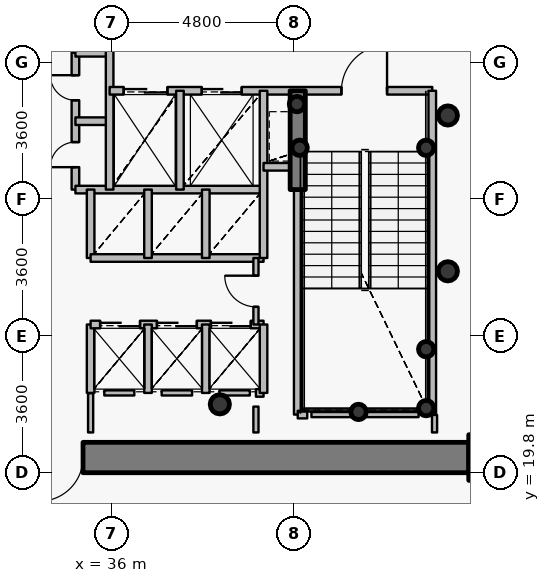
"""IFC4 building model, lengths in metres.
Left out: names, types, materials, properties, quantities, classifications, styles, units other than length and angle.
Written with IfcOpenShell. Run it as: python <this file> out.ifc"""

import sys

from ifc_helpers import new_model, si_unit, direction, frame, frame_2d, origin, origin_2d, place, context, subcontext, project, spatial, rectangle, hollow_circle, extrude, source, transform, mapped, element, fill, save


model = new_model("IFC4")
c1 = context("Model", 3, precision=1e-05, world=origin(), true_north=direction((0.0, 1.0)))
c2 = subcontext(c1, "Body", "Model", "MODEL_VIEW")
j1 = project(units=[si_unit("LENGTHUNIT", "METRE"), si_unit("PLANEANGLEUNIT", "RADIAN")], contexts=[c1])
p1 = place(None, origin())
s1 = spatial("IfcSite", under=j1, at=p1, CompositionType="ELEMENT")
p2 = place(p1, origin())
s2 = spatial("IfcBuilding", under=s1, at=p2, CompositionType="ELEMENT")
p3 = place(p2, frame((0.0, 0.0, 127.2)))
s3 = spatial("IfcBuildingStorey", under=s2, at=p3, CompositionType="ELEMENT", Elevation=127.2)
p4 = place(p3, frame((46.0, 20.2, 0.0), z_axis=(0.0, 0.0, 1.0), x_axis=(1.0, 0.0, 0.0)))
e1 = element("IfcColumn", 1, at=p4, inside=s3, PredefinedType="COLUMN", context=c2, shape_type="SweptSolid", body=[
    extrude(rectangle(XDim=1.2, YDim=1.2, at=origin_2d()), origin(), (0.0, 0.0, 1.0), 3.75),
])
p5 = place(p3, frame((38.85, 21.6, 0.0), z_axis=(0.0, 0.0, 1.0), x_axis=(1.0, 0.0, 0.0)))
e2 = element("IfcColumn", 2, at=p5, inside=s3, PredefinedType="COLUMN", context=c2, shape_type="SweptSolid", body=[
    extrude(hollow_circle(Radius=0.254, WallThickness=0.02, at=origin_2d()), origin(), (0.0, 0.0, 1.0), 3.75),
])
for number, where, z_axis, x_axis in (
    (3, (44.28, 21.5, 0.0), (0.0, 0.0, 1.0), (1.0, 0.0, 0.0)),
    (4, (44.28, 23.05, 0.0), (0.0, 0.0, 1.0), (1.0, 0.0, 0.0)),
    (5, (42.5, 21.4, 0.0), (0.0, 0.0, 1.0), (1.0, 0.0, 0.0)),
    (6, (40.95, 28.35, 0.0), (0.0, 0.0, 1.0), (1.0, 0.0, 0.0)),
    (7, (44.28, 28.35, 0.0), (0.0, 0.0, 1.0), (1.0, 0.0, 0.0)),
    (8, (40.88, 29.5, 0.0), (0.0, 0.0, 1.0), (1.0, 0.0, 0.0)),
):
    element("IfcColumn", number, at=place(p3, frame(where, z_axis=z_axis, x_axis=x_axis)), inside=s3, PredefinedType="COLUMN", context=c2, shape_type="SweptSolid", body=[
        extrude(hollow_circle(Radius=0.203, WallThickness=0.016, at=origin_2d()), origin(), (0.0, 0.0, 1.0), 3.75),
    ])
p6 = place(p3, frame((45.4, 20.2, 0.0), z_axis=(0.0, 0.0, 1.0), x_axis=(-1.0, 0.0, 0.0)))
e9 = element("IfcWall", 9, at=p6, inside=s3, PredefinedType="SHEAR", context=c2, shape_type="SweptSolid", body=[
    extrude(rectangle(XDim=18.8, YDim=0.8, at=frame_2d((9.4, 0.0))), origin(), (0.0, 0.0, 1.0), 2.95),
])
p7 = place(p6, frame((10.15, 0.0, 0.0)))
e10 = element("IfcOpeningElement", 10, at=p7, cuts=e9, PredefinedType="OPENING", context=c2, shape_type="SweptSolid", body=[
    extrude(rectangle(XDim=1.15, YDim=2.15, at=origin_2d()), frame((0.575, 0.41, 1.075), z_axis=(0.0, -1.0, 0.0), x_axis=(1.0, 0.0, 0.0)), (0.0, 0.0, 1.0), 0.82),
])
p8 = place(p3, frame((40.9, 27.25, 0.0), z_axis=(0.0, 0.0, 1.0), x_axis=(0.0, 1.0, 0.0)))
e11 = element("IfcWall", 11, at=p8, inside=s3, PredefinedType="SHEAR", context=c2, shape_type="SweptSolid", body=[
    extrude(rectangle(XDim=2.6, YDim=0.4, at=frame_2d((1.3, 0.0))), origin(), (0.0, 0.0, 1.0), 3.1),
])
for number, where, z_axis, x_axis in (
    (12, (44.85, 25.1, 0.0), (0.0, 0.0, 1.0), (1.0, 0.0, 0.0)),
    (13, (44.85, 29.2, 0.0), (0.0, 0.0, 1.0), (1.0, 0.0, 0.0)),
):
    element("IfcColumn", number, at=place(p3, frame(where, z_axis=z_axis, x_axis=x_axis)), inside=s3, PredefinedType="COLUMN", context=c2, shape_type="SweptSolid", body=[
        extrude(hollow_circle(Radius=0.254, WallThickness=0.02, at=origin_2d()), origin(), (0.0, 0.0, 1.0), 3.75),
    ])
p9 = place(p3, frame((35.05, 27.25, 0.0), z_axis=(0.0, 0.0, 1.0), x_axis=(0.0, 1.0, 0.0)))
e14 = element("IfcWall", 14, at=p9, inside=s3, PredefinedType="PARTITIONING", context=c2, shape_type="SweptSolid", body=[
    extrude(rectangle(XDim=3.6, YDim=0.2, at=frame_2d((1.8, 0.0))), origin(), (0.0, 0.0, 1.0), 3.5),
])
p10 = place(p9, frame((0.59, 0.0, 0.0)))
e15 = element("IfcOpeningElement", 15, at=p10, cuts=e14, PredefinedType="OPENING", context=c2, shape_type="SweptSolid", body=[
    extrude(rectangle(XDim=0.66, YDim=2.05, at=origin_2d()), frame((0.33, 0.11, 1.025), z_axis=(0.0, -1.0, 0.0), x_axis=(1.0, 0.0, 0.0)), (0.0, 0.0, 1.0), 0.22),
])
p11 = place(p9, frame((2.35, 0.0, 0.0)))
e16 = element("IfcOpeningElement", 16, at=p11, cuts=e14, PredefinedType="OPENING", context=c2, shape_type="SweptSolid", body=[
    extrude(rectangle(XDim=0.66, YDim=2.05, at=origin_2d()), frame((0.33, 0.11, 1.025), z_axis=(0.0, -1.0, 0.0), x_axis=(1.0, 0.0, 0.0)), (0.0, 0.0, 1.0), 0.22),
])
p12 = place(p3, frame((35.05, 27.25, 0.0), z_axis=(0.0, 0.0, 1.0), x_axis=(1.0, 0.0, 0.0)))
e17 = element("IfcWall", 17, at=p12, inside=s3, PredefinedType="PARTITIONING", context=c2, shape_type="SweptSolid", body=[
    extrude(rectangle(XDim=4.95, YDim=0.2, at=frame_2d((2.475, 0.0))), origin(), (0.0, 0.0, 1.0), 3.085),
])
for number, where, z_axis, x_axis in (
    (18, (35.05, 29.05, 0.0), (0.0, 0.0, 1.0), (1.0, 0.0, 0.0)),
    (19, (35.05, 30.85, 0.0), (0.0, 0.0, 1.0), (1.0, 0.0, 0.0)),
):
    element("IfcWall", number, at=place(p3, frame(where, z_axis=z_axis, x_axis=x_axis)), inside=s3, PredefinedType="PARTITIONING", context=c2, shape_type="SweptSolid", body=[
        extrude(rectangle(XDim=0.9, YDim=0.2, at=frame_2d((0.45, 0.0))), origin(), (0.0, 0.0, 1.0), 3.5),
    ])
p13 = place(p3, frame((35.45, 21.9, 0.0), z_axis=(0.0, 0.0, 1.0), x_axis=(0.0, 1.0, 0.0)))
e20 = element("IfcWall", 20, at=p13, inside=s3, PredefinedType="PARTITIONING", context=c2, shape_type="SweptSolid", body=[
    extrude(rectangle(XDim=1.8, YDim=0.2, at=frame_2d((0.9, 0.0))), origin(), (0.0, 0.0, 1.0), 3.5),
])
p14 = place(p3, frame((35.45, 23.7, 0.0), z_axis=(0.0, 0.0, 1.0), x_axis=(1.0, 0.0, 0.0)))
e21 = element("IfcWall", 21, at=p14, inside=s3, PredefinedType="PARTITIONING", context=c2, shape_type="SweptSolid", body=[
    extrude(rectangle(XDim=4.55, YDim=0.2, at=frame_2d((2.275, 0.0))), origin(), (0.0, 0.0, 1.0), 3.085),
])
p15 = place(p14, frame((0.25, 0.0, 0.0)))
e22 = element("IfcOpeningElement", 22, at=p15, cuts=e21, PredefinedType="OPENING", context=c2, shape_type="SweptSolid", body=[
    extrude(rectangle(XDim=1.05, YDim=2.15, at=origin_2d()), frame((0.525, 0.11, 1.075), z_axis=(0.0, -1.0, 0.0), x_axis=(1.0, 0.0, 0.0)), (0.0, 0.0, 1.0), 0.22),
])
p16 = place(p14, frame((1.745, 0.0, 0.0)))
e23 = element("IfcOpeningElement", 23, at=p16, cuts=e21, PredefinedType="OPENING", context=c2, shape_type="SweptSolid", body=[
    extrude(rectangle(XDim=1.05, YDim=2.15, at=origin_2d()), frame((0.525, 0.11, 1.075), z_axis=(0.0, -1.0, 0.0), x_axis=(1.0, 0.0, 0.0)), (0.0, 0.0, 1.0), 0.22),
])
p17 = place(p14, frame((3.165, 0.0, 0.0)))
e24 = element("IfcOpeningElement", 24, at=p17, cuts=e21, PredefinedType="OPENING", context=c2, shape_type="SweptSolid", body=[
    extrude(rectangle(XDim=1.05, YDim=2.15, at=origin_2d()), frame((0.525, 0.11, 1.075), z_axis=(0.0, -1.0, 0.0), x_axis=(1.0, 0.0, 0.0)), (0.0, 0.0, 1.0), 0.22),
])
p18 = place(p3, frame((35.45, 25.45, 0.0), z_axis=(0.0, 0.0, 1.0), x_axis=(0.0, 1.0, 0.0)))
e25 = element("IfcWall", 25, at=p18, inside=s3, PredefinedType="PARTITIONING", context=c2, shape_type="SweptSolid", body=[
    extrude(rectangle(XDim=1.8, YDim=0.2, at=frame_2d((0.9, 0.0))), origin(), (0.0, 0.0, 1.0), 3.5),
])
p19 = place(p3, frame((35.45, 25.45, 0.0), z_axis=(0.0, 0.0, 1.0), x_axis=(1.0, 0.0, 0.0)))
e26 = element("IfcWall", 26, at=p19, inside=s3, PredefinedType="PARTITIONING", context=c2, shape_type="SweptSolid", body=[
    extrude(rectangle(XDim=4.55, YDim=0.2, at=frame_2d((2.275, 0.0))), origin(), (0.0, 0.0, 1.0), 3.085),
])
p20 = place(p3, frame((35.95, 27.25, 0.0), z_axis=(0.0, 0.0, 1.0), x_axis=(0.0, 1.0, 0.0)))
e27 = element("IfcWall", 27, at=p20, inside=s3, PredefinedType="PARTITIONING", context=c2, shape_type="SweptSolid", body=[
    extrude(rectangle(XDim=3.8, YDim=0.2, at=frame_2d((1.9, 0.0))), origin(), (0.0, 0.0, 1.0), 3.5),
])
p21 = place(p3, frame((35.95, 29.85, 0.0), z_axis=(0.0, 0.0, 1.0), x_axis=(1.0, 0.0, 0.0)))
e28 = element("IfcWall", 28, at=p21, inside=s3, PredefinedType="PARTITIONING", context=c2, shape_type="SweptSolid", body=[
    extrude(rectangle(XDim=8.49, YDim=0.2, at=frame_2d((4.245, 0.0))), origin(), (0.0, 0.0, 1.0), 3.085),
])
p22 = place(p21, frame((6.1, 0.0, 0.0)))
e29 = element("IfcOpeningElement", 29, at=p22, cuts=e28, PredefinedType="OPENING", context=c2, shape_type="SweptSolid", body=[
    extrude(rectangle(XDim=1.2, YDim=2.15, at=origin_2d()), frame((0.6, 0.11, 1.075), z_axis=(0.0, -1.0, 0.0), x_axis=(1.0, 0.0, 0.0)), (0.0, 0.0, 1.0), 0.22),
])
p23 = place(p21, frame((0.37, 0.0, 0.0)))
e30 = element("IfcOpeningElement", 30, at=p23, cuts=e28, PredefinedType="OPENING", context=c2, shape_type="SweptSolid", body=[
    extrude(rectangle(XDim=1.15, YDim=2.15, at=origin_2d()), frame((0.575, 0.11, 1.075), z_axis=(0.0, -1.0, 0.0), x_axis=(1.0, 0.0, 0.0)), (0.0, 0.0, 1.0), 0.22),
])
p24 = place(p21, frame((2.425, 0.0, 0.0)))
e31 = element("IfcOpeningElement", 31, at=p24, cuts=e28, PredefinedType="OPENING", context=c2, shape_type="SweptSolid", body=[
    extrude(rectangle(XDim=1.05, YDim=2.15, at=origin_2d()), frame((0.525, 0.11, 1.075), z_axis=(0.0, -1.0, 0.0), x_axis=(1.0, 0.0, 0.0)), (0.0, 0.0, 1.0), 0.22),
])
for number, where, z_axis, x_axis in (
    (32, (36.96, 21.9, 0.0), (0.0, 0.0, 1.0), (0.0, 1.0, 0.0)),
    (33, (36.96, 25.45, 0.0), (0.0, 0.0, 1.0), (0.0, 1.0, 0.0)),
):
    element("IfcWall", number, at=place(p3, frame(where, z_axis=z_axis, x_axis=x_axis)), inside=s3, PredefinedType="PARTITIONING", context=c2, shape_type="SweptSolid", body=[
        extrude(rectangle(XDim=1.8, YDim=0.2, at=frame_2d((0.9, 0.0))), origin(), (0.0, 0.0, 1.0), 3.5),
    ])
p25 = place(p3, frame((37.8, 27.25, 0.0), z_axis=(0.0, 0.0, 1.0), x_axis=(0.0, 1.0, 0.0)))
e34 = element("IfcWall", 34, at=p25, inside=s3, PredefinedType="PARTITIONING", context=c2, shape_type="SweptSolid", body=[
    extrude(rectangle(XDim=2.6, YDim=0.2, at=frame_2d((1.3, 0.0))), origin(), (0.0, 0.0, 1.0), 3.5),
])
for number, where, z_axis, x_axis in (
    (35, (38.48, 21.9, 0.0), (0.0, 0.0, 1.0), (0.0, 1.0, 0.0)),
    (36, (38.48, 25.45, 0.0), (0.0, 0.0, 1.0), (0.0, 1.0, 0.0)),
):
    element("IfcWall", number, at=place(p3, frame(where, z_axis=z_axis, x_axis=x_axis)), inside=s3, PredefinedType="PARTITIONING", context=c2, shape_type="SweptSolid", body=[
        extrude(rectangle(XDim=1.8, YDim=0.2, at=frame_2d((0.9, 0.0))), origin(), (0.0, 0.0, 1.0), 3.5),
    ])
p26 = place(p3, frame((39.8, 21.9, 0.0), z_axis=(0.0, 0.0, 1.0), x_axis=(1.0, 0.0, 0.0)))
e37 = element("IfcWall", 37, at=p26, inside=s3, PredefinedType="PARTITIONING", context=c2, shape_type="SweptSolid", body=[
    extrude(rectangle(XDim=0.2, YDim=0.2, at=frame_2d((0.1, 0.0))), origin(), (0.0, 0.0, 1.0), 3.5),
])
p27 = place(p3, frame((39.8, 23.7, 0.0), z_axis=(0.0, 0.0, 1.0), x_axis=(0.0, 1.0, 0.0)))
e38 = element("IfcWall", 38, at=p27, inside=s3, PredefinedType="PARTITIONING", context=c2, shape_type="SweptSolid", body=[
    extrude(rectangle(XDim=1.75, YDim=0.135, at=frame_2d((0.875, 0.0))), origin(), (0.0, 0.0, 1.0), 3.5),
])
p28 = place(p27, frame((0.465, 0.0, 0.0)))
e39 = element("IfcOpeningElement", 39, at=p28, cuts=e38, PredefinedType="OPENING", context=c2, shape_type="SweptSolid", body=[
    extrude(rectangle(XDim=0.82, YDim=2.1, at=origin_2d()), frame((0.41, 0.078, 1.05), z_axis=(0.0, -1.0, 0.0), x_axis=(1.0, 0.0, 0.0)), (0.0, 0.0, 1.0), 0.155),
])
p29 = place(p3, frame((40.0, 21.9, 0.0), z_axis=(0.0, 0.0, 1.0), x_axis=(0.0, 1.0, 0.0)))
e40 = element("IfcWall", 40, at=p29, inside=s3, PredefinedType="PARTITIONING", context=c2, shape_type="SweptSolid", body=[
    extrude(rectangle(XDim=1.8, YDim=0.2, at=frame_2d((0.9, 0.0))), origin(), (0.0, 0.0, 1.0), 3.5),
])
p30 = place(p3, frame((40.0, 25.45, 0.0), z_axis=(0.0, 0.0, 1.0), x_axis=(0.0, 1.0, 0.0)))
e41 = element("IfcWall", 41, at=p30, inside=s3, PredefinedType="PARTITIONING", context=c2, shape_type="SweptSolid", body=[
    extrude(rectangle(XDim=4.4, YDim=0.2, at=frame_2d((2.2, 0.0))), origin(), (0.0, 0.0, 1.0), 3.5),
])
p31 = place(p3, frame((40.0, 27.85, 0.0), z_axis=(0.0, 0.0, 1.0), x_axis=(1.0, 0.0, 0.0)))
e42 = element("IfcWall", 42, at=p31, inside=s3, PredefinedType="PARTITIONING", context=c2, shape_type="SweptSolid", body=[
    extrude(rectangle(XDim=0.9, YDim=0.2, at=frame_2d((0.45, 0.0))), origin(), (0.0, 0.0, 1.0), 3.5),
])
p32 = place(p3, frame((40.9, 21.33, 0.0), z_axis=(0.0, 0.0, 1.0), x_axis=(0.0, 1.0, 0.0)))
e43 = element("IfcWall", 43, at=p32, inside=s3, PredefinedType="PARTITIONING", context=c2, shape_type="SweptSolid", body=[
    extrude(rectangle(XDim=5.91, YDim=0.2, at=frame_2d((2.955, 0.0))), origin(), (0.0, 0.0, 1.0), 3.035),
])
p33 = place(p3, frame((40.9, 21.33, 0.0), z_axis=(0.0, 0.0, 1.0), x_axis=(1.0, 0.0, 0.0)))
e44 = element("IfcWall", 44, at=p33, inside=s3, PredefinedType="PARTITIONING", context=c2, shape_type="SweptSolid", body=[
    extrude(rectangle(XDim=0.25, YDim=0.2, at=frame_2d((0.125, 0.0))), origin(), (0.0, 0.0, 1.0), 3.035),
])
p34 = place(p3, frame((44.44, 21.33, 0.0), z_axis=(0.0, 0.0, 1.0), x_axis=(0.0, 1.0, 0.0)))
e45 = element("IfcWall", 45, at=p34, inside=s3, PredefinedType="PARTITIONING", context=c2, shape_type="SweptSolid", body=[
    extrude(rectangle(XDim=8.52, YDim=0.2, at=frame_2d((4.26, 0.0))), origin(), (0.0, 0.0, 1.0), 3.5),
])
p35 = place(p3, frame((44.08, 21.33, 0.0), z_axis=(0.0, 0.0, 1.0), x_axis=(-1.0, 0.0, 0.0)))
e46 = element("IfcWall", 46, at=p35, inside=s3, PredefinedType="PARTITIONING", context=c2, shape_type="SweptSolid", body=[
    extrude(rectangle(XDim=2.82, YDim=0.135, at=frame_2d((1.41, 0.0))), origin(), (0.0, 0.0, 1.0), 3.035),
])
p36 = place(p3, frame((36.6, 21.9, 0.0), z_axis=(0.0, 0.0, 1.0), x_axis=(-1.0, 0.0, 0.0)))
e47 = element("IfcWall", 47, at=p36, inside=s3, PredefinedType="PARTITIONING", context=c2, shape_type="SweptSolid", body=[
    extrude(rectangle(XDim=0.79, YDim=0.135, at=frame_2d((0.395, 0.0))), origin(), (0.0, 0.0, 1.0), 3.5),
])
p37 = place(p3, frame((38.12, 21.9, 0.0), z_axis=(0.0, 0.0, 1.0), x_axis=(-1.0, 0.0, 0.0)))
e48 = element("IfcWall", 48, at=p37, inside=s3, PredefinedType="PARTITIONING", context=c2, shape_type="SweptSolid", body=[
    extrude(rectangle(XDim=0.8, YDim=0.135, at=frame_2d((0.4, 0.0))), origin(), (0.0, 0.0, 1.0), 3.5),
])
p38 = place(p3, frame((39.64, 21.9, 0.0), z_axis=(0.0, 0.0, 1.0), x_axis=(-1.0, 0.0, 0.0)))
e49 = element("IfcWall", 49, at=p38, inside=s3, PredefinedType="PARTITIONING", context=c2, shape_type="SweptSolid", body=[
    extrude(rectangle(XDim=0.8, YDim=0.135, at=frame_2d((0.4, 0.0))), origin(), (0.0, 0.0, 1.0), 3.085),
])
p39 = place(p3, frame((39.8, 20.86, 0.0), z_axis=(0.0, 0.0, 1.0), x_axis=(0.0, 1.0, 0.0)))
e50 = element("IfcWall", 50, at=p39, inside=s3, PredefinedType="PARTITIONING", context=c2, shape_type="SweptSolid", body=[
    extrude(rectangle(XDim=0.68, YDim=0.135, at=frame_2d((0.34, 0.0))), origin(), (0.0, 0.0, 1.0), 3.035),
])
p40 = place(p3, frame((44.5, 20.86, 0.0), z_axis=(0.0, 0.0, 1.0), x_axis=(0.0, 1.0, 0.0)))
e51 = element("IfcWall", 51, at=p40, inside=s3, PredefinedType="PARTITIONING", context=c2, shape_type="SweptSolid", body=[
    extrude(rectangle(XDim=0.46, YDim=0.135, at=frame_2d((0.23, 0.0))), origin(), (0.0, 0.0, 1.0), 3.5),
])
p41 = place(p3, frame((35.45, 21.89, 0.0), z_axis=(0.0, 0.0, 1.0), x_axis=(0.0, -1.0, 0.0)))
e52 = element("IfcWall", 52, at=p41, inside=s3, PredefinedType="PARTITIONING", context=c2, shape_type="SweptSolid", body=[
    extrude(rectangle(XDim=1.03, YDim=0.135, at=frame_2d((0.515, 0.0))), origin(), (0.0, 0.0, 1.0), 3.085),
])
p42 = place(p3, frame((45.41, 19.8, 0.0), z_axis=(0.0, 0.0, 1.0), x_axis=(1.0, 0.0, 0.0)))
e53 = element("IfcWall", 53, at=p42, inside=s3, PredefinedType="PARTITIONING", context=c2, shape_type="SweptSolid", body=[
    extrude(rectangle(XDim=0.99, YDim=0.135, at=frame_2d((0.495, 0.0))), origin(), (0.0, 0.0, 1.0), 2.935),
])
m1 = source(origin(), c2, "Body", "SweptSolid", [
    extrude(rectangle(XDim=1.15, YDim=2.15, at=origin_2d()), frame((0.575, 0.025, 1.075), z_axis=(0.0, -1.0, 0.0), x_axis=(1.0, 0.0, 0.0)), (0.0, 0.0, 1.0), 0.05),
])
p43 = place(p7, origin())
e54 = element("IfcDoor", 54, at=p43, inside=s3, OperationType="SINGLE_SWING_RIGHT", PredefinedType="DOOR", context=c2, shape_type="MappedRepresentation", body=[
    mapped(m1, transform((0.0, 0.0, 0.0), x_axis=(1.0, 0.0, 0.0), y_axis=(0.0, 1.0, 0.0), z_axis=(0.0, 0.0, 1.0), scale=1.0)),
])
fill(e10, e54)
m2 = source(origin(), c2, "Body", "SweptSolid", [
    extrude(rectangle(XDim=1.2, YDim=2.15, at=origin_2d()), frame((0.6, 0.025, 1.075), z_axis=(0.0, -1.0, 0.0), x_axis=(1.0, 0.0, 0.0)), (0.0, 0.0, 1.0), 0.05),
])
p44 = place(p22, origin())
e55 = element("IfcDoor", 55, at=p44, inside=s3, OperationType="SINGLE_SWING_RIGHT", PredefinedType="DOOR", context=c2, shape_type="MappedRepresentation", body=[
    mapped(m2, transform((0.0, 0.0, 0.0), x_axis=(1.0, 0.0, 0.0), y_axis=(0.0, 1.0, 0.0), z_axis=(0.0, 0.0, 1.0), scale=1.0)),
])
fill(e29, e55)
m3 = source(origin(), c2, "Body", "SweptSolid", [
    extrude(rectangle(XDim=1.15, YDim=2.15, at=origin_2d()), frame((0.575, 0.025, 1.075), z_axis=(0.0, -1.0, 0.0), x_axis=(1.0, 0.0, 0.0)), (0.0, 0.0, 1.0), 0.05),
])
p45 = place(p23, origin())
e56 = element("IfcDoor", 56, at=p45, inside=s3, OperationType="DOUBLE_DOOR_SLIDING", PredefinedType="USERDEFINED", context=c2, shape_type="MappedRepresentation", body=[
    mapped(m3, transform((0.0, 0.0, 0.0), x_axis=(1.0, 0.0, 0.0), y_axis=(0.0, 1.0, 0.0), z_axis=(0.0, 0.0, 1.0), scale=1.0)),
])
fill(e30, e56)
m4 = source(origin(), c2, "Body", "SweptSolid", [
    extrude(rectangle(XDim=1.05, YDim=2.15, at=origin_2d()), frame((0.525, 0.025, 1.075), z_axis=(0.0, -1.0, 0.0), x_axis=(1.0, 0.0, 0.0)), (0.0, 0.0, 1.0), 0.05),
])
p46 = place(p24, origin())
e57 = element("IfcDoor", 57, at=p46, inside=s3, OperationType="DOUBLE_DOOR_SLIDING", PredefinedType="USERDEFINED", context=c2, shape_type="MappedRepresentation", body=[
    mapped(m4, transform((0.0, 0.0, 0.0), x_axis=(1.0, 0.0, 0.0), y_axis=(0.0, 1.0, 0.0), z_axis=(0.0, 0.0, 1.0), scale=1.0)),
])
fill(e31, e57)
p47 = place(p15, origin())
e58 = element("IfcDoor", 58, at=p47, inside=s3, OperationType="DOUBLE_DOOR_SLIDING", PredefinedType="USERDEFINED", context=c2, shape_type="MappedRepresentation", body=[
    mapped(m4, transform((0.0, 0.0, 0.0), x_axis=(1.0, 0.0, 0.0), y_axis=(0.0, 1.0, 0.0), z_axis=(0.0, 0.0, 1.0), scale=1.0)),
])
fill(e22, e58)
p48 = place(p16, origin())
e59 = element("IfcDoor", 59, at=p48, inside=s3, OperationType="DOUBLE_DOOR_SLIDING", PredefinedType="USERDEFINED", context=c2, shape_type="MappedRepresentation", body=[
    mapped(m4, transform((0.0, 0.0, 0.0), x_axis=(1.0, 0.0, 0.0), y_axis=(0.0, 1.0, 0.0), z_axis=(0.0, 0.0, 1.0), scale=1.0)),
])
fill(e23, e59)
p49 = place(p17, origin())
e60 = element("IfcDoor", 60, at=p49, inside=s3, OperationType="DOUBLE_DOOR_SLIDING", PredefinedType="USERDEFINED", context=c2, shape_type="MappedRepresentation", body=[
    mapped(m4, transform((0.0, 0.0, 0.0), x_axis=(1.0, 0.0, 0.0), y_axis=(0.0, 1.0, 0.0), z_axis=(0.0, 0.0, 1.0), scale=1.0)),
])
fill(e24, e60)
m5 = source(origin(), c2, "Body", "SweptSolid", [
    extrude(rectangle(XDim=0.66, YDim=2.05, at=origin_2d()), frame((0.33, 0.025, 1.025), z_axis=(0.0, -1.0, 0.0), x_axis=(1.0, 0.0, 0.0)), (0.0, 0.0, 1.0), 0.05),
])
p50 = place(p10, origin())
e61 = element("IfcDoor", 61, at=p50, inside=s3, OperationType="SINGLE_SWING_LEFT", PredefinedType="USERDEFINED", context=c2, shape_type="MappedRepresentation", body=[
    mapped(m5, transform((0.0, 0.0, 0.0), x_axis=(1.0, 0.0, 0.0), y_axis=(0.0, 1.0, 0.0), z_axis=(0.0, 0.0, 1.0), scale=1.0)),
])
fill(e15, e61)
p51 = place(p11, origin())
e62 = element("IfcDoor", 62, at=p51, inside=s3, OperationType="SINGLE_SWING_RIGHT", PredefinedType="USERDEFINED", context=c2, shape_type="MappedRepresentation", body=[
    mapped(m5, transform((0.0, 0.0, 0.0), x_axis=(1.0, 0.0, 0.0), y_axis=(0.0, 1.0, 0.0), z_axis=(0.0, 0.0, 1.0), scale=1.0)),
])
fill(e16, e62)
m6 = source(origin(), c2, "Body", "SweptSolid", [
    extrude(rectangle(XDim=0.82, YDim=2.1, at=origin_2d()), frame((0.41, 0.025, 1.05), z_axis=(0.0, -1.0, 0.0), x_axis=(1.0, 0.0, 0.0)), (0.0, 0.0, 1.0), 0.05),
])
p52 = place(p28, origin())
e63 = element("IfcDoor", 63, at=p52, inside=s3, OperationType="SINGLE_SWING_RIGHT", PredefinedType="DOOR", context=c2, shape_type="MappedRepresentation", body=[
    mapped(m6, transform((0.0, 0.0, 0.0), x_axis=(1.0, 0.0, 0.0), y_axis=(0.0, 1.0, 0.0), z_axis=(0.0, 0.0, 1.0), scale=1.0)),
])
fill(e39, e63)
save(model, sys.argv[1])
